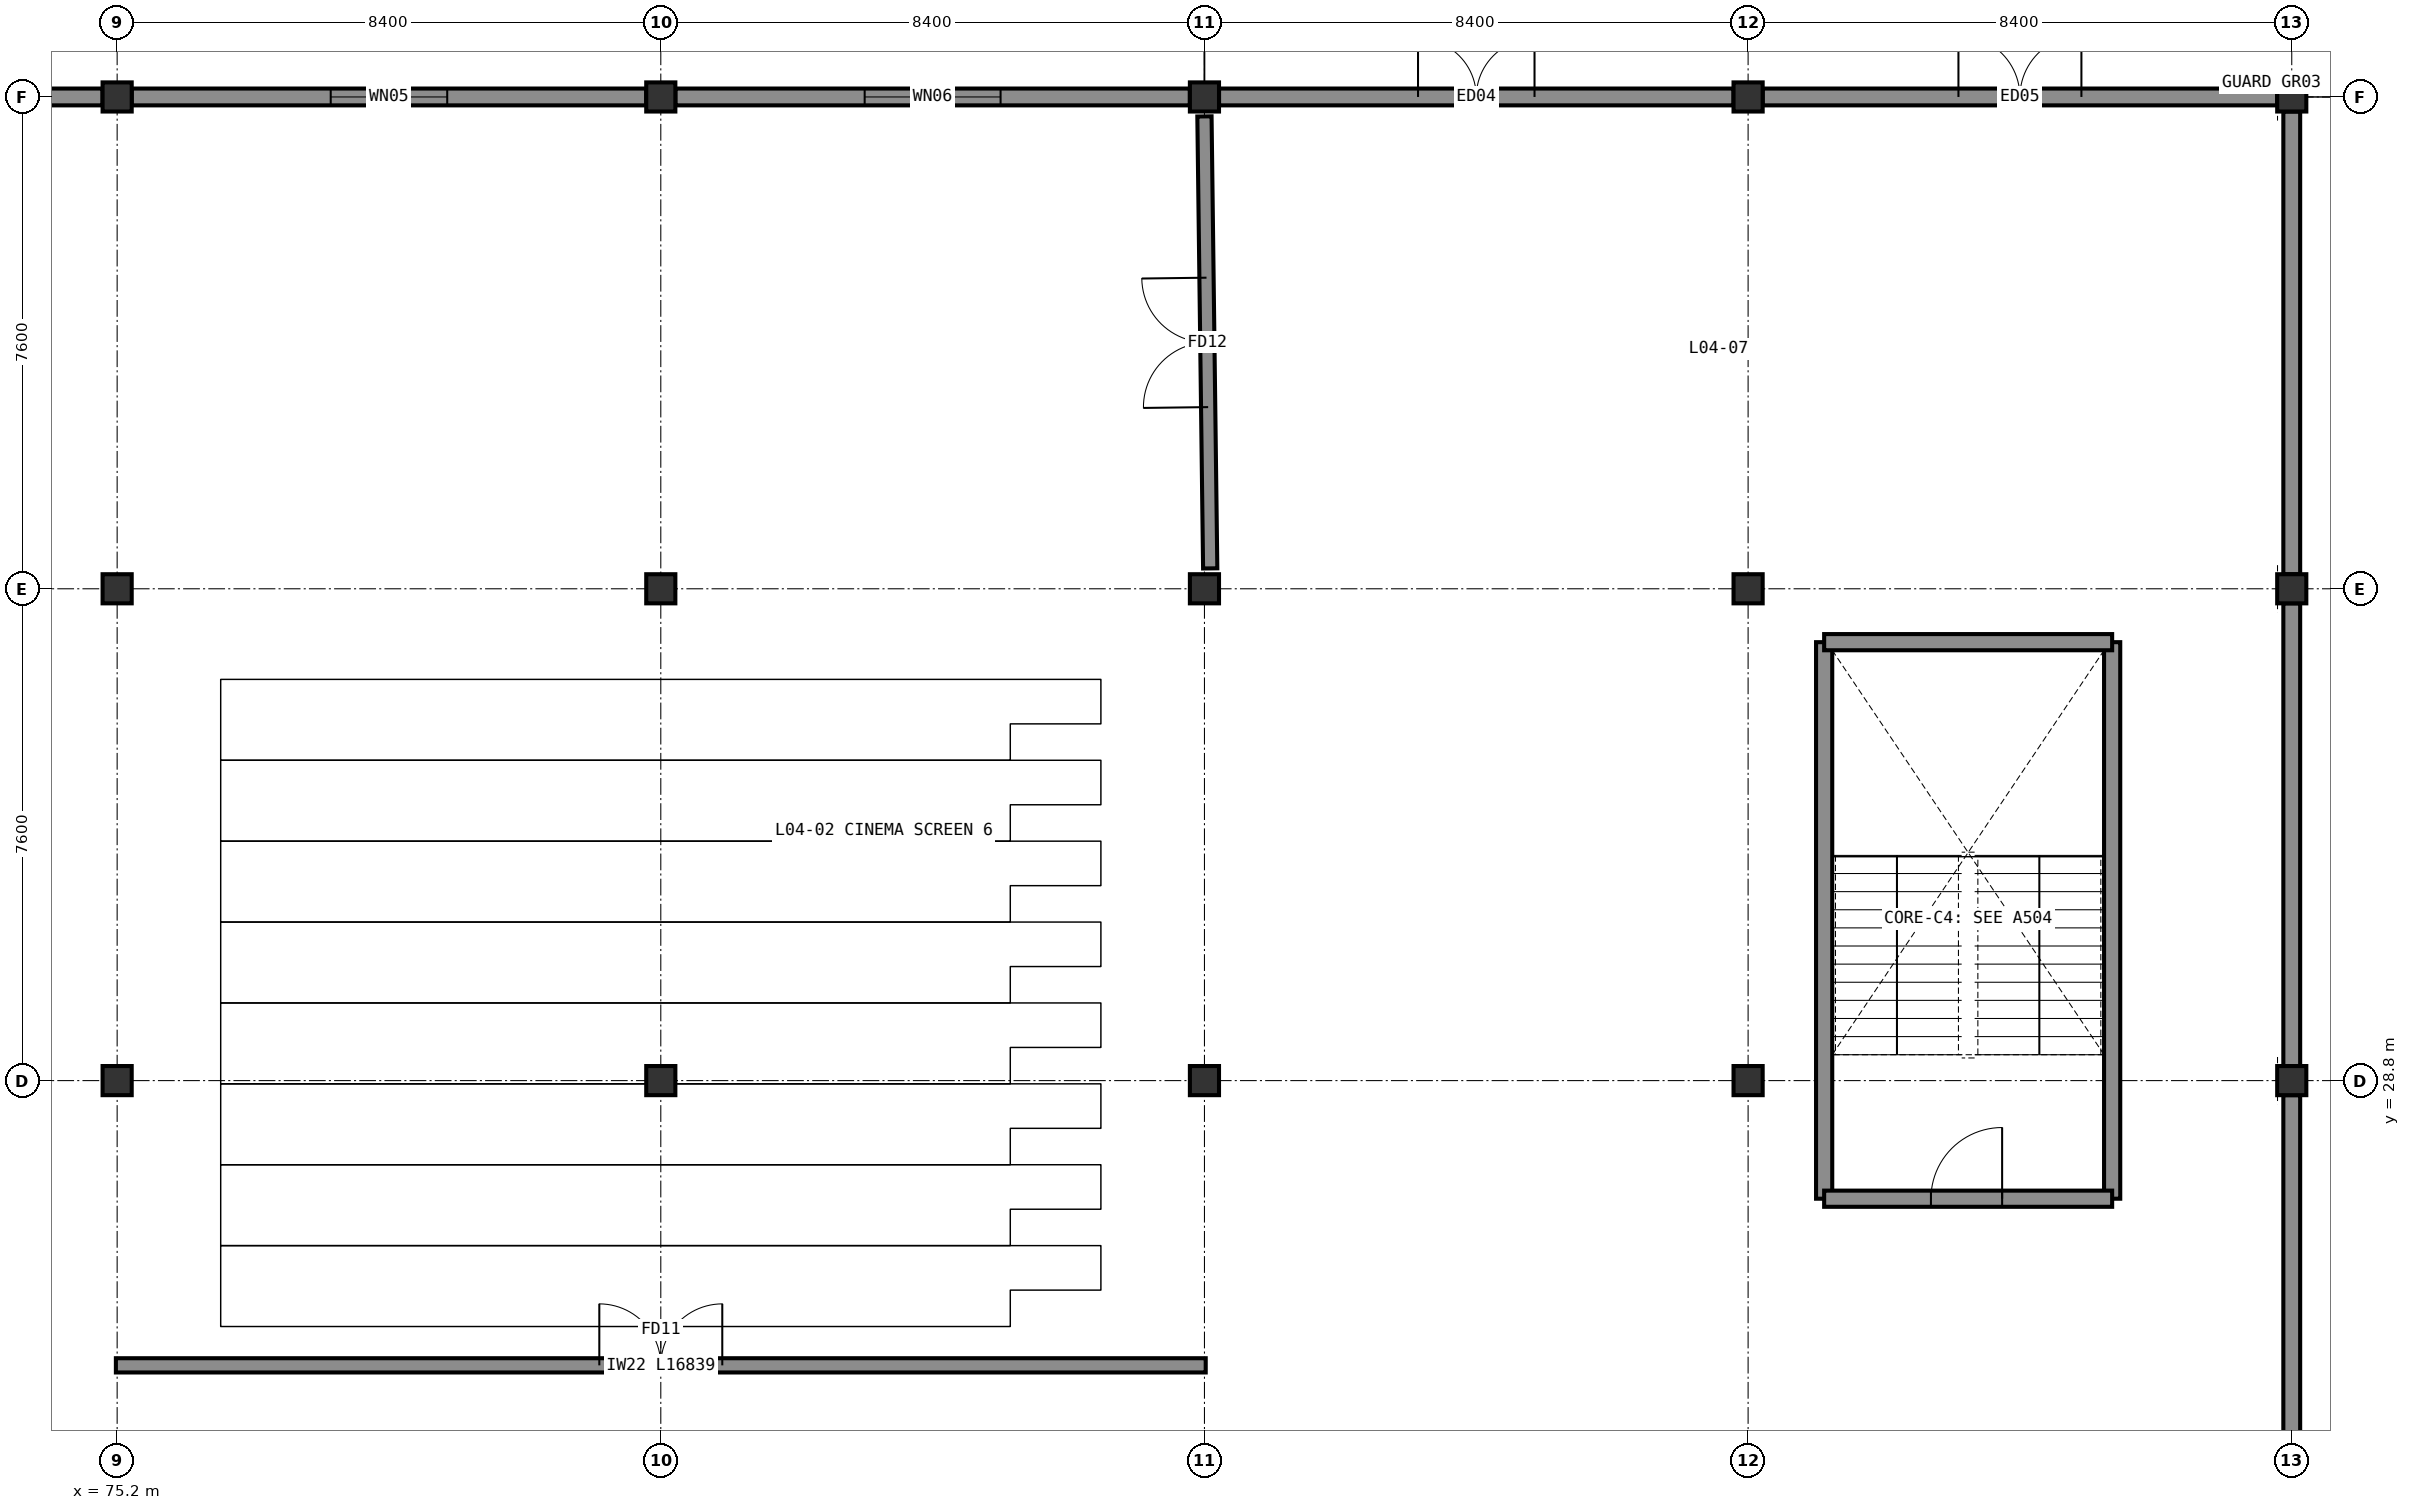
"""IFC4 building model, lengths in metres.
Left out: names, types, materials, properties, quantities, classifications, styles, units other than length and angle.
Written with IfcOpenShell. Run it as: python <this file> out.ifc"""

import sys

from ifc_helpers import new_model, si_unit, direction, frame, frame_2d, origin, origin_2d, place, context, subcontext, project, spatial, rectangle, extrude, element, fill, save


model = new_model("IFC4")
c1 = context("Model", 3, precision=1e-05, world=origin(), true_north=direction((0.0, 1.0)))
c2 = subcontext(c1, "Body", "Model", "MODEL_VIEW")
j1 = project(units=[si_unit("LENGTHUNIT", "METRE"), si_unit("PLANEANGLEUNIT", "RADIAN")], contexts=[c1])
p1 = place(None, origin())
s1 = spatial("IfcSite", under=j1, at=p1, CompositionType="ELEMENT")
p2 = place(p1, origin())
s2 = spatial("IfcBuilding", under=s1, at=p2, CompositionType="ELEMENT")
p3 = place(p2, frame((0.0, 0.0, 18.0)))
s3 = spatial("IfcBuildingStorey", under=s2, at=p3, CompositionType="ELEMENT", Elevation=18.0)
for number, where, z_axis, x_axis in (
    (1, (75.2, 28.8, 0.0), (0.0, 0.0, 1.0), (1.0, 0.0, 0.0)),
    (2, (83.6, 28.8, 0.0), (0.0, 0.0, 1.0), (1.0, 0.0, 0.0)),
    (3, (92.0, 28.8, 0.0), (0.0, 0.0, 1.0), (1.0, 0.0, 0.0)),
    (4, (100.4, 28.8, 0.0), (0.0, 0.0, 1.0), (1.0, 0.0, 0.0)),
    (5, (108.8, 28.8, 0.0), (0.0, 0.0, 1.0), (1.0, 0.0, 0.0)),
    (6, (75.2, 36.4, 0.0), (0.0, 0.0, 1.0), (1.0, 0.0, 0.0)),
    (7, (83.6, 36.4, 0.0), (0.0, 0.0, 1.0), (1.0, 0.0, 0.0)),
    (8, (92.0, 36.4, 0.0), (0.0, 0.0, 1.0), (1.0, 0.0, 0.0)),
    (9, (100.4, 36.4, 0.0), (0.0, 0.0, 1.0), (1.0, 0.0, 0.0)),
    (10, (108.8, 36.4, 0.0), (0.0, 0.0, 1.0), (1.0, 0.0, 0.0)),
    (11, (75.2, 44.0, 0.0), (0.0, 0.0, 1.0), (1.0, 0.0, 0.0)),
    (12, (83.6, 44.0, 0.0), (0.0, 0.0, 1.0), (1.0, 0.0, 0.0)),
    (13, (92.0, 44.0, 0.0), (0.0, 0.0, 1.0), (1.0, 0.0, 0.0)),
    (14, (100.4, 44.0, 0.0), (0.0, 0.0, 1.0), (1.0, 0.0, 0.0)),
    (15, (108.8, 44.0, 0.0), (0.0, 0.0, 1.0), (1.0, 0.0, 0.0)),
):
    element("IfcColumn", number, at=place(p3, frame(where, z_axis=z_axis, x_axis=x_axis)), inside=s3, PredefinedType="COLUMN", context=c2, shape_type="SweptSolid", body=[
        extrude(rectangle(XDim=0.45, YDim=0.45, at=origin_2d()), origin(), (0.0, 0.0, 1.0), 4.2),
    ])
p4 = place(p3, frame((108.8, 21.425, 0.0), z_axis=(0.0, 0.0, 1.0), x_axis=(0.0, 1.0, 0.0)))
e16 = element("IfcWall", 16, at=p4, inside=s3, PredefinedType="SOLIDWALL", context=c2, shape_type="SweptSolid", body=[
    extrude(rectangle(XDim=7.15, YDim=0.26, at=frame_2d((3.575, 0.0))), origin(), (0.0, 0.0, 1.0), 3.135),
])
p5 = place(p3, frame((108.8, 29.025, 0.0), z_axis=(0.0, 0.0, 1.0), x_axis=(0.0, 1.0, 0.0)))
e17 = element("IfcWall", 17, at=p5, inside=s3, PredefinedType="SOLIDWALL", context=c2, shape_type="SweptSolid", body=[
    extrude(rectangle(XDim=7.15, YDim=0.26, at=frame_2d((3.575, 0.0))), origin(), (0.0, 0.0, 1.0), 3.135),
])
p6 = place(p3, frame((108.8, 36.625, 0.0), z_axis=(0.0, 0.0, 1.0), x_axis=(0.0, 1.0, 0.0)))
e18 = element("IfcWall", 18, at=p6, inside=s3, PredefinedType="SOLIDWALL", context=c2, shape_type="SweptSolid", body=[
    extrude(rectangle(XDim=7.15, YDim=0.26, at=frame_2d((3.575, 0.0))), origin(), (0.0, 0.0, 1.0), 3.95),
])
p7 = place(p3, frame((67.025, 44.0, 0.0), z_axis=(0.0, 0.0, 1.0), x_axis=(1.0, 0.0, 0.0)))
e19 = element("IfcWall", 19, at=p7, inside=s3, PredefinedType="SOLIDWALL", context=c2, shape_type="SweptSolid", body=[
    extrude(rectangle(XDim=7.95, YDim=0.26, at=frame_2d((3.975, 0.0))), origin(), (0.0, 0.0, 1.0), 3.95),
])
p8 = place(p7, frame((3.15, 0.0, 0.95)))
e20 = element("IfcOpeningElement", 20, at=p8, cuts=e19, PredefinedType="OPENING", context=c2, shape_type="SweptSolid", body=[
    extrude(rectangle(XDim=1.65, YDim=1.5, at=frame_2d((0.825, 0.75))), frame((0.0, 0.14, 0.0), z_axis=(0.0, -1.0, 0.0), x_axis=(1.0, 0.0, 0.0)), (0.0, 0.0, 1.0), 0.28),
])
p9 = place(p3, frame((75.425, 44.0, 0.0), z_axis=(0.0, 0.0, 1.0), x_axis=(1.0, 0.0, 0.0)))
e21 = element("IfcWall", 21, at=p9, inside=s3, PredefinedType="SOLIDWALL", context=c2, shape_type="SweptSolid", body=[
    extrude(rectangle(XDim=7.95, YDim=0.26, at=frame_2d((3.975, 0.0))), origin(), (0.0, 0.0, 1.0), 3.95),
])
p10 = place(p9, frame((3.075, 0.0, 0.95)))
e22 = element("IfcOpeningElement", 22, at=p10, cuts=e21, PredefinedType="OPENING", context=c2, shape_type="SweptSolid", body=[
    extrude(rectangle(XDim=1.8, YDim=1.5, at=frame_2d((0.9, 0.75))), frame((0.0, 0.14, 0.0), z_axis=(0.0, -1.0, 0.0), x_axis=(1.0, 0.0, 0.0)), (0.0, 0.0, 1.0), 0.28),
])
p11 = place(p3, frame((83.825, 44.0, 0.0), z_axis=(0.0, 0.0, 1.0), x_axis=(1.0, 0.0, 0.0)))
e23 = element("IfcWall", 23, at=p11, inside=s3, PredefinedType="SOLIDWALL", context=c2, shape_type="SweptSolid", body=[
    extrude(rectangle(XDim=7.95, YDim=0.26, at=frame_2d((3.975, 0.0))), origin(), (0.0, 0.0, 1.0), 3.95),
])
p12 = place(p11, frame((2.925, 0.0, 0.95)))
e24 = element("IfcOpeningElement", 24, at=p12, cuts=e23, PredefinedType="OPENING", context=c2, shape_type="SweptSolid", body=[
    extrude(rectangle(XDim=2.1, YDim=1.5, at=frame_2d((1.05, 0.75))), frame((0.0, 0.14, 0.0), z_axis=(0.0, -1.0, 0.0), x_axis=(1.0, 0.0, 0.0)), (0.0, 0.0, 1.0), 0.28),
])
p13 = place(p3, frame((92.225, 44.0, 0.0), z_axis=(0.0, 0.0, 1.0), x_axis=(1.0, 0.0, 0.0)))
e25 = element("IfcWall", 25, at=p13, inside=s3, PredefinedType="SOLIDWALL", context=c2, shape_type="SweptSolid", body=[
    extrude(rectangle(XDim=7.95, YDim=0.26, at=frame_2d((3.975, 0.0))), origin(), (0.0, 0.0, 1.0), 3.95),
])
p14 = place(p13, frame((3.075, 0.0, 0.0)))
e26 = element("IfcOpeningElement", 26, at=p14, cuts=e25, PredefinedType="OPENING", context=c2, shape_type="SweptSolid", body=[
    extrude(rectangle(XDim=1.8, YDim=2.2, at=frame_2d((0.9, 1.1))), frame((0.0, 0.14, 0.0), z_axis=(0.0, -1.0, 0.0), x_axis=(1.0, 0.0, 0.0)), (0.0, 0.0, 1.0), 0.28),
])
p15 = place(p3, frame((100.625, 44.0, 0.0), z_axis=(0.0, 0.0, 1.0), x_axis=(1.0, 0.0, 0.0)))
e27 = element("IfcWall", 27, at=p15, inside=s3, PredefinedType="SOLIDWALL", context=c2, shape_type="SweptSolid", body=[
    extrude(rectangle(XDim=7.95, YDim=0.26, at=frame_2d((3.975, 0.0))), origin(), (0.0, 0.0, 1.0), 3.95),
])
p16 = place(p15, frame((3.025, 0.0, 0.0)))
e28 = element("IfcOpeningElement", 28, at=p16, cuts=e27, PredefinedType="OPENING", context=c2, shape_type="SweptSolid", body=[
    extrude(rectangle(XDim=1.9, YDim=2.25, at=frame_2d((0.95, 1.125))), frame((0.0, 0.14, 0.0), z_axis=(0.0, -1.0, 0.0), x_axis=(1.0, 0.0, 0.0)), (0.0, 0.0, 1.0), 0.28),
])
for number, where, z_axis, x_axis in (
    (29, (101.575, 26.975, 0.0), (0.0, 0.0, 1.0), (0.0, 1.0, 0.0)),
    (30, (106.025, 26.975, 0.0), (0.0, 0.0, 1.0), (0.0, 1.0, 0.0)),
):
    element("IfcWall", number, at=place(p3, frame(where, z_axis=z_axis, x_axis=x_axis)), inside=s3, PredefinedType="SHEAR", context=c2, shape_type="SweptSolid", body=[
        extrude(rectangle(XDim=8.6, YDim=0.25, at=frame_2d((4.3, 0.0))), origin(), (0.0, 0.0, 1.0), 3.96),
    ])
p17 = place(p3, frame((101.575, 35.575, 0.0), z_axis=(0.0, 0.0, 1.0), x_axis=(1.0, 0.0, 0.0)))
e31 = element("IfcWall", 31, at=p17, inside=s3, PredefinedType="SHEAR", context=c2, shape_type="SweptSolid", body=[
    extrude(rectangle(XDim=4.45, YDim=0.25, at=frame_2d((2.225, 0.0))), origin(), (0.0, 0.0, 1.0), 3.96),
])
p18 = place(p3, frame((101.575, 26.975, 0.0), z_axis=(0.0, 0.0, 1.0), x_axis=(1.0, 0.0, 0.0)))
e32 = element("IfcWall", 32, at=p18, inside=s3, PredefinedType="SHEAR", context=c2, shape_type="SweptSolid", body=[
    extrude(rectangle(XDim=4.45, YDim=0.25, at=frame_2d((2.225, 0.0))), origin(), (0.0, 0.0, 1.0), 3.96),
])
p19 = place(p18, frame((1.65, 0.0, 0.0)))
e33 = element("IfcOpeningElement", 33, at=p19, cuts=e32, PredefinedType="OPENING", context=c2, shape_type="SweptSolid", body=[
    extrude(rectangle(XDim=1.1, YDim=2.1, at=frame_2d((0.55, 1.05))), frame((0.0, 0.135, 0.0), z_axis=(0.0, -1.0, 0.0), x_axis=(1.0, 0.0, 0.0)), (0.0, 0.0, 1.0), 0.27),
])
p20 = place(p3, frame((75.18, 24.4, 0.0), z_axis=(0.0, 0.0, 1.0), x_axis=(1.0, 0.0, 0.0)))
e34 = element("IfcWall", 34, at=p20, inside=s3, PredefinedType="SOLIDWALL", context=c2, shape_type="SweptSolid", body=[
    extrude(rectangle(XDim=16.839, YDim=0.22, at=frame_2d((8.419, 0.0))), origin(), (0.0, 0.0, 1.0), 3.95),
])
p21 = place(p20, frame((7.469, 0.0, 0.0)))
e35 = element("IfcOpeningElement", 35, at=p21, cuts=e34, PredefinedType="OPENING", context=c2, shape_type="SweptSolid", body=[
    extrude(rectangle(XDim=1.9, YDim=2.2, at=frame_2d((0.95, 1.1))), frame((0.0, 0.12, 0.0), z_axis=(0.0, -1.0, 0.0), x_axis=(1.0, 0.0, 0.0)), (0.0, 0.0, 1.0), 0.24),
])
p22 = place(p3, frame((92.089, 36.715, 0.0), z_axis=(0.0, 0.0, 1.0), x_axis=(-0.012757630579, 0.999918618119, 0.0)))
e36 = element("IfcWall", 36, at=p22, inside=s3, PredefinedType="SOLIDWALL", context=c2, shape_type="SweptSolid", body=[
    extrude(rectangle(XDim=6.985, YDim=0.22, at=frame_2d((3.492, 0.0))), origin(), (0.0, 0.0, 1.0), 3.95),
])
p23 = place(p22, frame((2.492, 0.0, 0.0)))
e37 = element("IfcOpeningElement", 37, at=p23, cuts=e36, PredefinedType="OPENING", context=c2, shape_type="SweptSolid", body=[
    extrude(rectangle(XDim=2.0, YDim=2.25, at=frame_2d((1.0, 1.125))), frame((0.0, 0.12, 0.0), z_axis=(0.0, -1.0, 0.0), x_axis=(1.0, 0.0, 0.0)), (0.0, 0.0, 1.0), 0.24),
])
p24 = place(p10, origin())
e38 = element("IfcWindow", 38, at=p24, inside=s3, PartitioningType="DOUBLE_PANEL_VERTICAL", PredefinedType="WINDOW", context=c2, shape_type="SweptSolid", body=[
    extrude(rectangle(XDim=1.8, YDim=1.5, at=frame_2d((0.9, 0.75))), frame((0.0, 0.03, 0.0), z_axis=(0.0, -1.0, 0.0), x_axis=(1.0, 0.0, 0.0)), (0.0, 0.0, 1.0), 0.06),
])
fill(e22, e38)
p25 = place(p12, origin())
e39 = element("IfcWindow", 39, at=p25, inside=s3, PartitioningType="DOUBLE_PANEL_VERTICAL", PredefinedType="WINDOW", context=c2, shape_type="SweptSolid", body=[
    extrude(rectangle(XDim=2.1, YDim=1.5, at=frame_2d((1.05, 0.75))), frame((0.0, 0.03, 0.0), z_axis=(0.0, -1.0, 0.0), x_axis=(1.0, 0.0, 0.0)), (0.0, 0.0, 1.0), 0.06),
])
fill(e24, e39)
p26 = place(p14, origin())
e40 = element("IfcDoor", 40, at=p26, inside=s3, OperationType="DOUBLE_DOOR_SINGLE_SWING", PredefinedType="DOOR", context=c2, shape_type="SweptSolid", body=[
    extrude(rectangle(XDim=1.8, YDim=2.2, at=frame_2d((0.9, 1.1))), frame((0.0, 0.025, 0.0), z_axis=(0.0, -1.0, 0.0), x_axis=(1.0, 0.0, 0.0)), (0.0, 0.0, 1.0), 0.05),
])
fill(e26, e40)
p27 = place(p16, origin())
e41 = element("IfcDoor", 41, at=p27, inside=s3, OperationType="DOUBLE_DOOR_SINGLE_SWING", PredefinedType="DOOR", context=c2, shape_type="SweptSolid", body=[
    extrude(rectangle(XDim=1.9, YDim=2.25, at=frame_2d((0.95, 1.125))), frame((0.0, 0.025, 0.0), z_axis=(0.0, -1.0, 0.0), x_axis=(1.0, 0.0, 0.0)), (0.0, 0.0, 1.0), 0.05),
])
fill(e28, e41)
p28 = place(p19, frame((1.1, 0.0, 0.0), z_axis=(0.0, 0.0, 1.0), x_axis=(-1.0, 0.0, 0.0)))
e42 = element("IfcDoor", 42, at=p28, inside=s3, OperationType="SINGLE_SWING_RIGHT", PredefinedType="DOOR", context=c2, shape_type="SweptSolid", body=[
    extrude(rectangle(XDim=1.1, YDim=2.1, at=frame_2d((0.55, 1.05))), frame((0.0, 0.025, 0.0), z_axis=(0.0, -1.0, 0.0), x_axis=(1.0, 0.0, 0.0)), (0.0, 0.0, 1.0), 0.05),
])
fill(e33, e42)
p29 = place(p21, origin())
e43 = element("IfcDoor", 43, at=p29, inside=s3, OperationType="DOUBLE_DOOR_SINGLE_SWING", PredefinedType="DOOR", context=c2, shape_type="SweptSolid", body=[
    extrude(rectangle(XDim=1.9, YDim=2.2, at=frame_2d((0.95, 1.1))), frame((0.0, 0.025, 0.0), z_axis=(0.0, -1.0, 0.0), x_axis=(1.0, 0.0, 0.0)), (0.0, 0.0, 1.0), 0.05),
])
fill(e35, e43)
p30 = place(p23, origin())
e44 = element("IfcDoor", 44, at=p30, inside=s3, OperationType="DOUBLE_DOOR_SINGLE_SWING", PredefinedType="DOOR", context=c2, shape_type="SweptSolid", body=[
    extrude(rectangle(XDim=2.0, YDim=2.25, at=frame_2d((1.0, 1.125))), frame((0.0, 0.025, 0.0), z_axis=(0.0, -1.0, 0.0), x_axis=(1.0, 0.0, 0.0)), (0.0, 0.0, 1.0), 0.05),
])
fill(e37, e44)
save(model, sys.argv[1])
